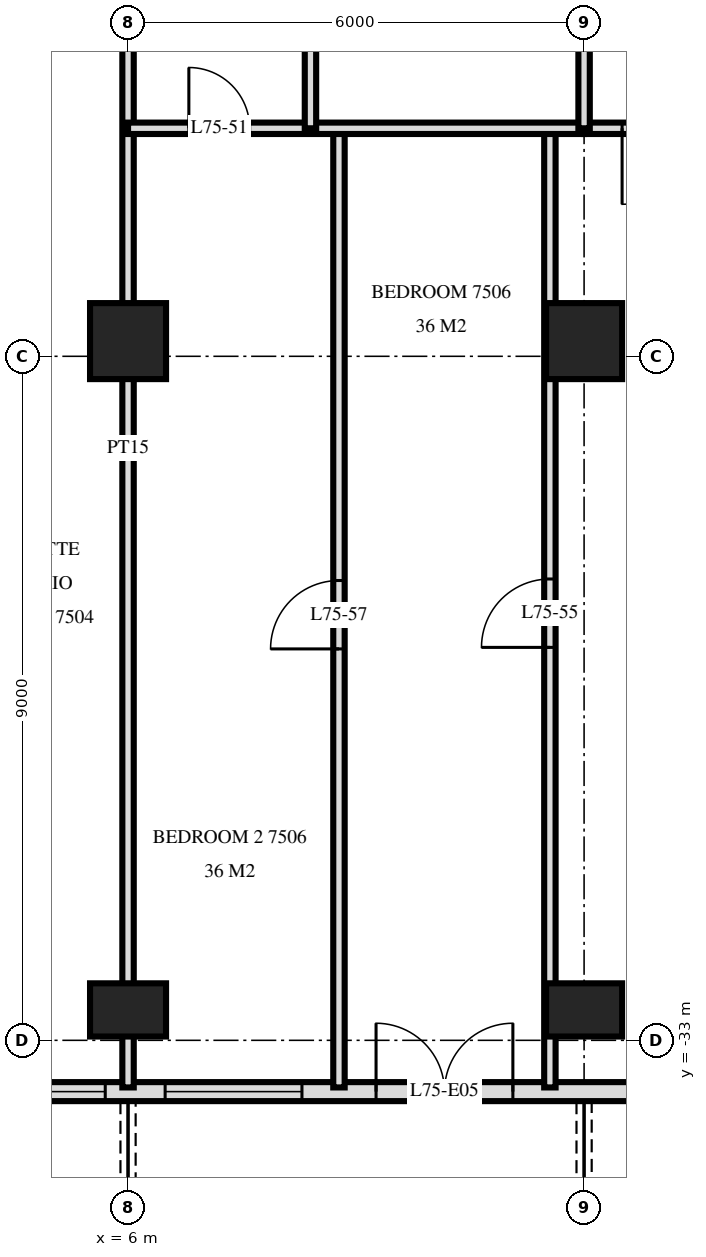
"""IFC4 building model, lengths in metres.
Left out: names, types, materials, properties, quantities, classifications, styles, units other than length and angle.
Written with IfcOpenShell. Run it as: python <this file> out.ifc"""

import sys

from ifc_helpers import new_model, si_unit, direction, frame, frame_2d, origin, origin_2d, place, context, subcontext, project, spatial, rectangle, extrude, element, fill, save


model = new_model("IFC4")
c1 = context("Model", 3, precision=1e-05, world=origin(), true_north=direction((0.0, 1.0)))
c2 = subcontext(c1, "Body", "Model", "MODEL_VIEW")
j1 = project(units=[si_unit("LENGTHUNIT", "METRE"), si_unit("PLANEANGLEUNIT", "RADIAN")], contexts=[c1])
p1 = place(None, origin())
s1 = spatial("IfcSite", under=j1, at=p1, CompositionType="ELEMENT")
p2 = place(p1, origin())
s2 = spatial("IfcBuilding", under=s1, at=p2, CompositionType="ELEMENT")
p3 = place(p2, frame((0.0, 0.0, 284.1)))
s3 = spatial("IfcBuildingStorey", under=s2, at=p3, CompositionType="ELEMENT", Elevation=284.1)
p4 = place(p3, frame((6.0, -32.6, 0.0), z_axis=(0.0, 0.0, 1.0), x_axis=(1.0, 0.0, 0.0)))
e1 = element("IfcColumn", 1, at=p4, inside=s3, PredefinedType="COLUMN", context=c2, shape_type="SweptSolid", body=[
    extrude(rectangle(XDim=1.0, YDim=0.7, at=origin_2d()), origin(), (0.0, 0.0, 1.0), 3.5),
])
p5 = place(p3, frame((6.0, -23.8, 0.0), z_axis=(0.0, 0.0, 1.0), x_axis=(1.0, 0.0, 0.0)))
e2 = element("IfcColumn", 2, at=p5, inside=s3, PredefinedType="COLUMN", context=c2, shape_type="SweptSolid", body=[
    extrude(rectangle(XDim=1.0, YDim=1.0, at=origin_2d()), origin(), (0.0, 0.0, 1.0), 3.5),
])
p6 = place(p3, frame((12.0, -32.6, 0.0), z_axis=(0.0, 0.0, 1.0), x_axis=(1.0, 0.0, 0.0)))
e3 = element("IfcColumn", 3, at=p6, inside=s3, PredefinedType="COLUMN", context=c2, shape_type="SweptSolid", body=[
    extrude(rectangle(XDim=1.0, YDim=0.7, at=origin_2d()), origin(), (0.0, 0.0, 1.0), 3.5),
])
p7 = place(p3, frame((12.0, -23.8, 0.0), z_axis=(0.0, 0.0, 1.0), x_axis=(1.0, 0.0, 0.0)))
e4 = element("IfcColumn", 4, at=p7, inside=s3, PredefinedType="COLUMN", context=c2, shape_type="SweptSolid", body=[
    extrude(rectangle(XDim=1.0, YDim=1.0, at=origin_2d()), origin(), (0.0, 0.0, 1.0), 3.5),
])
p8 = place(p3, frame((-18.575, -33.675, 0.0), z_axis=(0.0, 0.0, 1.0), x_axis=(1.0, 0.0, 0.0)))
e5 = element("IfcWall", 5, at=p8, inside=s3, PredefinedType="SOLIDWALL", context=c2, shape_type="SweptSolid", body=[
    extrude(rectangle(XDim=37.151, YDim=0.25, at=frame_2d((18.575, 0.0))), origin(), (0.0, 0.0, 1.0), 3.22),
])
p9 = place(p8, frame((1.175, 0.0, 0.0)))
e6 = element("IfcOpeningElement", 6, at=p9, cuts=e5, PredefinedType="OPENING", context=c2, shape_type="SweptSolid", body=[
    extrude(rectangle(XDim=1.8, YDim=2.4, at=frame_2d((0.9, 1.2))), frame((0.0, 0.135, 0.0), z_axis=(0.0, -1.0, 0.0), x_axis=(1.0, 0.0, 0.0)), (0.0, 0.0, 1.0), 0.27),
])
p10 = place(p8, frame((4.4, 0.0, 0.9)))
e7 = element("IfcOpeningElement", 7, at=p10, cuts=e5, PredefinedType="OPENING", context=c2, shape_type="SweptSolid", body=[
    extrude(rectangle(XDim=1.8, YDim=1.5, at=frame_2d((0.9, 0.75))), frame((0.0, 0.135, 0.0), z_axis=(0.0, -1.0, 0.0), x_axis=(1.0, 0.0, 0.0)), (0.0, 0.0, 1.0), 0.27),
])
p11 = place(p8, frame((6.875, 0.0, 0.9)))
e8 = element("IfcOpeningElement", 8, at=p11, cuts=e5, PredefinedType="OPENING", context=c2, shape_type="SweptSolid", body=[
    extrude(rectangle(XDim=2.4, YDim=1.5, at=frame_2d((1.2, 0.75))), frame((0.0, 0.135, 0.0), z_axis=(0.0, -1.0, 0.0), x_axis=(1.0, 0.0, 0.0)), (0.0, 0.0, 1.0), 0.27),
])
p12 = place(p8, frame((10.175, 0.0, 0.0)))
e9 = element("IfcOpeningElement", 9, at=p12, cuts=e5, PredefinedType="OPENING", context=c2, shape_type="SweptSolid", body=[
    extrude(rectangle(XDim=1.8, YDim=2.4, at=frame_2d((0.9, 1.2))), frame((0.0, 0.135, 0.0), z_axis=(0.0, -1.0, 0.0), x_axis=(1.0, 0.0, 0.0)), (0.0, 0.0, 1.0), 0.27),
])
p13 = place(p8, frame((13.175, 0.0, 0.0)))
e10 = element("IfcOpeningElement", 10, at=p13, cuts=e5, PredefinedType="OPENING", context=c2, shape_type="SweptSolid", body=[
    extrude(rectangle(XDim=1.8, YDim=2.4, at=frame_2d((0.9, 1.2))), frame((0.0, 0.135, 0.0), z_axis=(0.0, -1.0, 0.0), x_axis=(1.0, 0.0, 0.0)), (0.0, 0.0, 1.0), 0.27),
])
p14 = place(p8, frame((15.875, 0.0, 0.9)))
e11 = element("IfcOpeningElement", 11, at=p14, cuts=e5, PredefinedType="OPENING", context=c2, shape_type="SweptSolid", body=[
    extrude(rectangle(XDim=2.4, YDim=1.5, at=frame_2d((1.2, 0.75))), frame((0.0, 0.135, 0.0), z_axis=(0.0, -1.0, 0.0), x_axis=(1.0, 0.0, 0.0)), (0.0, 0.0, 1.0), 0.27),
])
p15 = place(p8, frame((19.175, 0.0, 0.0)))
e12 = element("IfcOpeningElement", 12, at=p15, cuts=e5, PredefinedType="OPENING", context=c2, shape_type="SweptSolid", body=[
    extrude(rectangle(XDim=1.8, YDim=2.4, at=frame_2d((0.9, 1.2))), frame((0.0, 0.135, 0.0), z_axis=(0.0, -1.0, 0.0), x_axis=(1.0, 0.0, 0.0)), (0.0, 0.0, 1.0), 0.27),
])
p16 = place(p8, frame((21.875, 0.0, 0.9)))
e13 = element("IfcOpeningElement", 13, at=p16, cuts=e5, PredefinedType="OPENING", context=c2, shape_type="SweptSolid", body=[
    extrude(rectangle(XDim=2.4, YDim=1.5, at=frame_2d((1.2, 0.75))), frame((0.0, 0.135, 0.0), z_axis=(0.0, -1.0, 0.0), x_axis=(1.0, 0.0, 0.0)), (0.0, 0.0, 1.0), 0.27),
])
p17 = place(p8, frame((25.063, 0.0, 0.9)))
e14 = element("IfcOpeningElement", 14, at=p17, cuts=e5, PredefinedType="OPENING", context=c2, shape_type="SweptSolid", body=[
    extrude(rectangle(XDim=1.8, YDim=1.5, at=frame_2d((0.9, 0.75))), frame((0.0, 0.135, 0.0), z_axis=(0.0, -1.0, 0.0), x_axis=(1.0, 0.0, 0.0)), (0.0, 0.0, 1.0), 0.27),
])
p18 = place(p8, frame((27.838, 0.0, 0.0)))
e15 = element("IfcOpeningElement", 15, at=p18, cuts=e5, PredefinedType="OPENING", context=c2, shape_type="SweptSolid", body=[
    extrude(rectangle(XDim=1.8, YDim=2.4, at=frame_2d((0.9, 1.2))), frame((0.0, 0.135, 0.0), z_axis=(0.0, -1.0, 0.0), x_axis=(1.0, 0.0, 0.0)), (0.0, 0.0, 1.0), 0.27),
])
p19 = place(p8, frame((31.175, 0.0, 0.0)))
e16 = element("IfcOpeningElement", 16, at=p19, cuts=e5, PredefinedType="OPENING", context=c2, shape_type="SweptSolid", body=[
    extrude(rectangle(XDim=1.8, YDim=2.4, at=frame_2d((0.9, 1.2))), frame((0.0, 0.135, 0.0), z_axis=(0.0, -1.0, 0.0), x_axis=(1.0, 0.0, 0.0)), (0.0, 0.0, 1.0), 0.27),
])
p20 = place(p3, frame((12.0, -21.0, 0.0), z_axis=(0.0, 0.0, 1.0), x_axis=(0.0, 1.0, 0.0)))
e17 = element("IfcWall", 17, at=p20, inside=s3, PredefinedType="PARTITIONING", context=c2, shape_type="SweptSolid", body=[
    extrude(rectangle(XDim=4.2, YDim=0.15, at=frame_2d((2.1, 0.0))), origin(), (0.0, 0.0, 1.0), 3.22),
])
p21 = place(p20, frame((1.6, 0.0, 0.0)))
e18 = element("IfcOpeningElement", 18, at=p21, cuts=e17, PredefinedType="OPENING", context=c2, shape_type="SweptSolid", body=[
    extrude(rectangle(XDim=1.0, YDim=2.1, at=frame_2d((0.5, 1.05))), frame((0.0, 0.085, 0.0), z_axis=(0.0, -1.0, 0.0), x_axis=(1.0, 0.0, 0.0)), (0.0, 0.0, 1.0), 0.17),
])
p22 = place(p3, frame((11.55, -33.62, 0.0), z_axis=(0.0, 0.0, 1.0), x_axis=(0.0, 1.0, 0.0)))
e19 = element("IfcWall", 19, at=p22, inside=s3, PredefinedType="PARTITIONING", context=c2, shape_type="SweptSolid", body=[
    extrude(rectangle(XDim=12.62, YDim=0.15, at=frame_2d((6.31, 0.0))), origin(), (0.0, 0.0, 1.0), 3.22),
])
p23 = place(p22, frame((5.79, 0.0, 0.0)))
e20 = element("IfcOpeningElement", 20, at=p23, cuts=e19, PredefinedType="OPENING", context=c2, shape_type="SweptSolid", body=[
    extrude(rectangle(XDim=0.9, YDim=2.1, at=frame_2d((0.45, 1.05))), frame((0.0, 0.085, 0.0), z_axis=(0.0, -1.0, 0.0), x_axis=(1.0, 0.0, 0.0)), (0.0, 0.0, 1.0), 0.17),
])
p24 = place(p3, frame((8.775, -33.62, 0.0), z_axis=(0.0, 0.0, 1.0), x_axis=(0.0, 1.0, 0.0)))
e21 = element("IfcWall", 21, at=p24, inside=s3, PredefinedType="PARTITIONING", context=c2, shape_type="SweptSolid", body=[
    extrude(rectangle(XDim=12.62, YDim=0.15, at=frame_2d((6.31, 0.0))), origin(), (0.0, 0.0, 1.0), 3.22),
])
p25 = place(p24, frame((5.77, 0.0, 0.0)))
e22 = element("IfcOpeningElement", 22, at=p25, cuts=e21, PredefinedType="OPENING", context=c2, shape_type="SweptSolid", body=[
    extrude(rectangle(XDim=0.9, YDim=2.1, at=frame_2d((0.45, 1.05))), frame((0.0, 0.085, 0.0), z_axis=(0.0, -1.0, 0.0), x_axis=(1.0, 0.0, 0.0)), (0.0, 0.0, 1.0), 0.17),
])
p26 = place(p3, frame((8.4, -21.0, 0.0), z_axis=(0.0, 0.0, 1.0), x_axis=(0.0, 1.0, 0.0)))
e23 = element("IfcWall", 23, at=p26, inside=s3, PredefinedType="PARTITIONING", context=c2, shape_type="SweptSolid", body=[
    extrude(rectangle(XDim=4.2, YDim=0.15, at=frame_2d((2.1, 0.0))), origin(), (0.0, 0.0, 1.0), 3.22),
])
p27 = place(p3, frame((6.0, -33.62, 0.0), z_axis=(0.0, 0.0, 1.0), x_axis=(0.0, 1.0, 0.0)))
e24 = element("IfcWall", 24, at=p27, inside=s3, PredefinedType="PARTITIONING", context=c2, shape_type="SweptSolid", body=[
    extrude(rectangle(XDim=16.82, YDim=0.15, at=frame_2d((8.41, 0.0))), origin(), (0.0, 0.0, 1.0), 3.22),
])
p28 = place(p3, frame((12.0, -21.0, 0.0), z_axis=(0.0, 0.0, 1.0), x_axis=(1.0, 0.0, 0.0)))
e25 = element("IfcWall", 25, at=p28, inside=s3, PredefinedType="PARTITIONING", context=c2, shape_type="SweptSolid", body=[
    extrude(rectangle(XDim=2.0, YDim=0.15, at=frame_2d((1.0, 0.0))), origin(), (0.0, 0.0, 1.0), 3.22),
])
p29 = place(p28, frame((0.5, 0.0, 0.0)))
e26 = element("IfcOpeningElement", 26, at=p29, cuts=e25, PredefinedType="OPENING", context=c2, shape_type="SweptSolid", body=[
    extrude(rectangle(XDim=1.0, YDim=2.1, at=frame_2d((0.5, 1.05))), frame((0.0, 0.085, 0.0), z_axis=(0.0, -1.0, 0.0), x_axis=(1.0, 0.0, 0.0)), (0.0, 0.0, 1.0), 0.17),
])
p30 = place(p3, frame((6.0, -21.0, 0.0), z_axis=(0.0, 0.0, 1.0), x_axis=(1.0, 0.0, 0.0)))
e27 = element("IfcWall", 27, at=p30, inside=s3, PredefinedType="PARTITIONING", context=c2, shape_type="SweptSolid", body=[
    extrude(rectangle(XDim=6.0, YDim=0.15, at=frame_2d((3.0, 0.0))), origin(), (0.0, 0.0, 1.0), 3.22),
])
p31 = place(p30, frame((0.8, 0.0, 0.0)))
e28 = element("IfcOpeningElement", 28, at=p31, cuts=e27, PredefinedType="OPENING", context=c2, shape_type="SweptSolid", body=[
    extrude(rectangle(XDim=0.8, YDim=2.1, at=frame_2d((0.4, 1.05))), frame((0.0, 0.085, 0.0), z_axis=(0.0, -1.0, 0.0), x_axis=(1.0, 0.0, 0.0)), (0.0, 0.0, 1.0), 0.17),
])
p32 = place(p16, origin())
e29 = element("IfcWindow", 29, at=p32, inside=s3, PartitioningType="SINGLE_PANEL", PredefinedType="WINDOW", context=c2, shape_type="SweptSolid", body=[
    extrude(rectangle(XDim=2.4, YDim=1.5, at=frame_2d((1.2, 0.75))), frame((0.0, 0.03, 0.0), z_axis=(0.0, -1.0, 0.0), x_axis=(1.0, 0.0, 0.0)), (0.0, 0.0, 1.0), 0.06),
])
fill(e13, e29)
p33 = place(p17, origin())
e30 = element("IfcWindow", 30, at=p33, inside=s3, PartitioningType="SINGLE_PANEL", PredefinedType="WINDOW", context=c2, shape_type="SweptSolid", body=[
    extrude(rectangle(XDim=1.8, YDim=1.5, at=frame_2d((0.9, 0.75))), frame((0.0, 0.03, 0.0), z_axis=(0.0, -1.0, 0.0), x_axis=(1.0, 0.0, 0.0)), (0.0, 0.0, 1.0), 0.06),
])
fill(e14, e30)
p34 = place(p18, origin())
e31 = element("IfcDoor", 31, at=p34, inside=s3, OperationType="DOUBLE_DOOR_SINGLE_SWING", PredefinedType="DOOR", context=c2, shape_type="SweptSolid", body=[
    extrude(rectangle(XDim=1.8, YDim=2.4, at=frame_2d((0.9, 1.2))), frame((0.0, 0.025, 0.0), z_axis=(0.0, -1.0, 0.0), x_axis=(1.0, 0.0, 0.0)), (0.0, 0.0, 1.0), 0.05),
])
fill(e15, e31)
p35 = place(p31, origin())
e32 = element("IfcDoor", 32, at=p35, inside=s3, OperationType="SINGLE_SWING_RIGHT", PredefinedType="DOOR", context=c2, shape_type="SweptSolid", body=[
    extrude(rectangle(XDim=0.8, YDim=2.1, at=frame_2d((0.4, 1.05))), frame((0.0, 0.025, 0.0), z_axis=(0.0, -1.0, 0.0), x_axis=(1.0, 0.0, 0.0)), (0.0, 0.0, 1.0), 0.05),
])
fill(e28, e32)
p36 = place(p29, frame((0.5, 0.0, 0.0), z_axis=(0.0, 0.0, 1.0), x_axis=(-1.0, 0.0, 0.0)))
e33 = element("IfcDoor", 33, at=p36, inside=s3, OperationType="SINGLE_SWING_LEFT", PredefinedType="DOOR", context=c2, shape_type="SweptSolid", body=[
    extrude(rectangle(XDim=1.0, YDim=2.1, at=frame_2d((0.0, 1.05))), frame((0.0, -0.025, 0.0), z_axis=(0.0, 1.0, 0.0), x_axis=(-1.0, 0.0, 0.0)), (0.0, 0.0, 1.0), 0.05),
])
fill(e26, e33)
p37 = place(p23, origin())
e34 = element("IfcDoor", 34, at=p37, inside=s3, OperationType="SINGLE_SWING_RIGHT", PredefinedType="DOOR", context=c2, shape_type="SweptSolid", body=[
    extrude(rectangle(XDim=0.9, YDim=2.1, at=frame_2d((0.45, 1.05))), frame((0.0, 0.025, 0.0), z_axis=(0.0, -1.0, 0.0), x_axis=(1.0, 0.0, 0.0)), (0.0, 0.0, 1.0), 0.05),
])
fill(e20, e34)
p38 = place(p25, origin())
e35 = element("IfcDoor", 35, at=p38, inside=s3, OperationType="SINGLE_SWING_RIGHT", PredefinedType="DOOR", context=c2, shape_type="SweptSolid", body=[
    extrude(rectangle(XDim=0.9, YDim=2.1, at=frame_2d((0.45, 1.05))), frame((0.0, 0.025, 0.0), z_axis=(0.0, -1.0, 0.0), x_axis=(1.0, 0.0, 0.0)), (0.0, 0.0, 1.0), 0.05),
])
fill(e22, e35)
save(model, sys.argv[1])
